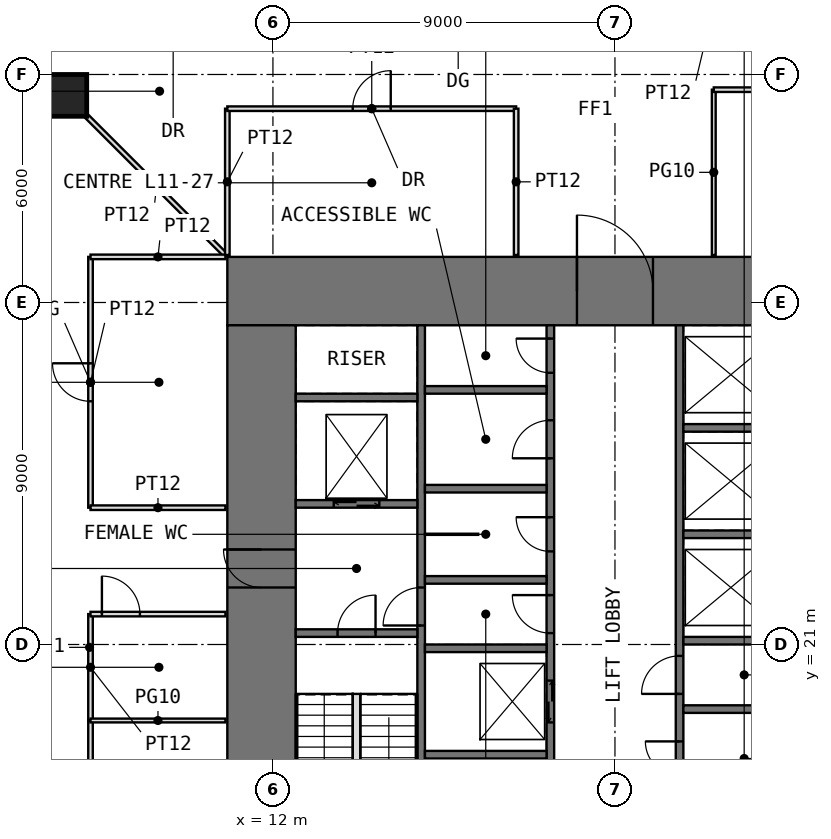
"""IFC4 building model, lengths in metres.
Left out: names, types, materials, properties, quantities, classifications, styles, units other than length and angle.
Written with IfcOpenShell. Run it as: python <this file> out.ifc"""

import sys

from ifc_helpers import new_model, si_unit, direction, frame, frame_2d, origin, origin_2d, place, context, subcontext, project, spatial, rectangle, extrude, element, fill, save


model = new_model("IFC4")
c1 = context("Model", 3, precision=1e-05, world=origin(), true_north=direction((0.0, 1.0)))
c2 = subcontext(c1, "Body", "Model", "MODEL_VIEW")
j1 = project(units=[si_unit("LENGTHUNIT", "METRE"), si_unit("PLANEANGLEUNIT", "RADIAN")], contexts=[c1])
p1 = place(None, origin())
s1 = spatial("IfcSite", under=j1, at=p1, CompositionType="ELEMENT")
p2 = place(p1, origin())
s2 = spatial("IfcBuilding", under=s1, at=p2, CompositionType="ELEMENT")
p3 = place(p2, frame((0.0, 0.0, 50.5)))
s3 = spatial("IfcBuildingStorey", under=s2, at=p3, CompositionType="ELEMENT", Elevation=50.5)
p4 = place(p3, frame((6.55, 35.45, 0.0), z_axis=(0.0, 0.0, 1.0), x_axis=(1.0, 0.0, 0.0)))
e1 = element("IfcColumn", 1, at=p4, inside=s3, PredefinedType="COLUMN", context=c2, shape_type="SweptSolid", body=[
    extrude(rectangle(XDim=1.1, YDim=1.1, at=origin_2d()), origin(), (0.0, 0.0, 1.0), 4.0),
])
p5 = place(p3, frame((10.8, 30.3, -0.05), z_axis=(0.0, 0.0, 1.0), x_axis=(1.0, 0.0, 0.0)))
e2 = element("IfcWall", 2, at=p5, inside=s3, PredefinedType="SHEAR", context=c2, shape_type="SweptSolid", body=[
    extrude(rectangle(XDim=20.4, YDim=1.8, at=frame_2d((10.2, 0.0))), origin(), (0.0, 0.0, 1.0), 4.0),
])
p6 = place(p5, frame((9.2, 0.0, 0.05)))
e3 = element("IfcOpeningElement", 3, at=p6, cuts=e2, PredefinedType="OPENING", context=c2, shape_type="SweptSolid", body=[
    extrude(rectangle(XDim=2.0, YDim=2.2, at=frame_2d((1.0, 1.1))), frame((0.0, 0.91, 0.0), z_axis=(0.0, -1.0, 0.0), x_axis=(1.0, 0.0, 0.0)), (0.0, 0.0, 1.0), 1.82),
])
p7 = place(p3, frame((11.7, 12.6, -0.05), z_axis=(0.0, 0.0, 1.0), x_axis=(0.0, 1.0, 0.0)))
e4 = element("IfcWall", 4, at=p7, inside=s3, PredefinedType="SHEAR", context=c2, shape_type="SweptSolid", body=[
    extrude(rectangle(XDim=16.8, YDim=1.8, at=frame_2d((8.4, 0.0))), origin(), (0.0, 0.0, 1.0), 4.0),
])
p8 = place(p7, frame((9.9, 0.0, 0.05)))
e5 = element("IfcOpeningElement", 5, at=p8, cuts=e4, PredefinedType="OPENING", context=c2, shape_type="SweptSolid", body=[
    extrude(rectangle(XDim=1.0, YDim=2.2, at=frame_2d((0.5, 1.1))), frame((0.0, 0.91, 0.0), z_axis=(0.0, -1.0, 0.0), x_axis=(1.0, 0.0, 0.0)), (0.0, 0.0, 1.0), 1.82),
])
p9 = place(p3, frame((15.9, 12.6, -0.05), z_axis=(0.0, 0.0, 1.0), x_axis=(0.0, 1.0, 0.0)))
e6 = element("IfcWall", 6, at=p9, inside=s3, PredefinedType="SHEAR", context=c2, shape_type="SweptSolid", body=[
    extrude(rectangle(XDim=16.8, YDim=0.2, at=frame_2d((8.4, 0.0))), origin(), (0.0, 0.0, 1.0), 4.0),
])
p10 = place(p9, frame((8.9, 0.0, 0.05)))
e7 = element("IfcOpeningElement", 7, at=p10, cuts=e6, PredefinedType="OPENING", context=c2, shape_type="SweptSolid", body=[
    extrude(rectangle(XDim=1.0, YDim=2.2, at=frame_2d((0.5, 1.1))), frame((0.0, 0.11, 0.0), z_axis=(0.0, -1.0, 0.0), x_axis=(1.0, 0.0, 0.0)), (0.0, 0.0, 1.0), 0.22),
])
p11 = place(p3, frame((19.3, 12.6, -0.05), z_axis=(0.0, 0.0, 1.0), x_axis=(0.0, 1.0, 0.0)))
e8 = element("IfcWall", 8, at=p11, inside=s3, PredefinedType="SHEAR", context=c2, shape_type="SweptSolid", body=[
    extrude(rectangle(XDim=16.8, YDim=0.2, at=frame_2d((8.4, 0.0))), origin(), (0.0, 0.0, 1.0), 4.0),
])
p12 = place(p11, frame((8.7, 0.0, 0.05)))
e9 = element("IfcOpeningElement", 9, at=p12, cuts=e8, PredefinedType="OPENING", context=c2, shape_type="SweptSolid", body=[
    extrude(rectangle(XDim=1.0, YDim=2.2, at=frame_2d((0.5, 1.1))), frame((0.0, 0.11, 0.0), z_axis=(0.0, -1.0, 0.0), x_axis=(1.0, 0.0, 0.0)), (0.0, 0.0, 1.0), 0.22),
])
p13 = place(p11, frame((10.85, 0.0, 0.05)))
e10 = element("IfcOpeningElement", 10, at=p13, cuts=e8, PredefinedType="OPENING", context=c2, shape_type="SweptSolid", body=[
    extrude(rectangle(XDim=0.9, YDim=2.2, at=frame_2d((0.45, 1.1))), frame((0.0, 0.11, 0.0), z_axis=(0.0, -1.0, 0.0), x_axis=(1.0, 0.0, 0.0)), (0.0, 0.0, 1.0), 0.22),
])
p14 = place(p11, frame((13.3, 0.0, 0.05)))
e11 = element("IfcOpeningElement", 11, at=p14, cuts=e8, PredefinedType="OPENING", context=c2, shape_type="SweptSolid", body=[
    extrude(rectangle(XDim=1.0, YDim=2.2, at=frame_2d((0.5, 1.1))), frame((0.0, 0.11, 0.0), z_axis=(0.0, -1.0, 0.0), x_axis=(1.0, 0.0, 0.0)), (0.0, 0.0, 1.0), 0.22),
])
p15 = place(p11, frame((15.55, 0.0, 0.05)))
e12 = element("IfcOpeningElement", 12, at=p15, cuts=e8, PredefinedType="OPENING", context=c2, shape_type="SweptSolid", body=[
    extrude(rectangle(XDim=0.9, YDim=2.2, at=frame_2d((0.45, 1.1))), frame((0.0, 0.11, 0.0), z_axis=(0.0, -1.0, 0.0), x_axis=(1.0, 0.0, 0.0)), (0.0, 0.0, 1.0), 0.22),
])
p16 = place(p11, frame((0.75, 0.0, 0.05)))
e13 = element("IfcOpeningElement", 13, at=p16, cuts=e8, PredefinedType="OPENING", context=c2, shape_type="SweptSolid", body=[
    extrude(rectangle(XDim=1.1, YDim=2.2, at=frame_2d((0.55, 1.1))), frame((0.0, 0.11, 0.0), z_axis=(0.0, -1.0, 0.0), x_axis=(1.0, 0.0, 0.0)), (0.0, 0.0, 1.0), 0.22),
])
p17 = place(p11, frame((3.55, 0.0, 0.05)))
e14 = element("IfcOpeningElement", 14, at=p17, cuts=e8, PredefinedType="OPENING", context=c2, shape_type="SweptSolid", body=[
    extrude(rectangle(XDim=1.1, YDim=2.2, at=frame_2d((0.55, 1.1))), frame((0.0, 0.11, 0.0), z_axis=(0.0, -1.0, 0.0), x_axis=(1.0, 0.0, 0.0)), (0.0, 0.0, 1.0), 0.22),
])
p18 = place(p11, frame((6.35, 0.0, 0.05)))
e15 = element("IfcOpeningElement", 15, at=p18, cuts=e8, PredefinedType="OPENING", context=c2, shape_type="SweptSolid", body=[
    extrude(rectangle(XDim=1.1, YDim=2.2, at=frame_2d((0.55, 1.1))), frame((0.0, 0.11, 0.0), z_axis=(0.0, -1.0, 0.0), x_axis=(1.0, 0.0, 0.0)), (0.0, 0.0, 1.0), 0.22),
])
p19 = place(p3, frame((22.7, 12.6, -0.05), z_axis=(0.0, 0.0, 1.0), x_axis=(0.0, 1.0, 0.0)))
e16 = element("IfcWall", 16, at=p19, inside=s3, PredefinedType="SHEAR", context=c2, shape_type="SweptSolid", body=[
    extrude(rectangle(XDim=16.8, YDim=0.2, at=frame_2d((8.4, 0.0))), origin(), (0.0, 0.0, 1.0), 4.0),
])
p20 = place(p19, frame((0.45, 0.0, 0.05)))
e17 = element("IfcOpeningElement", 17, at=p20, cuts=e16, PredefinedType="OPENING", context=c2, shape_type="SweptSolid", body=[
    extrude(rectangle(XDim=0.9, YDim=2.2, at=frame_2d((0.45, 1.1))), frame((0.0, 0.11, 0.0), z_axis=(0.0, -1.0, 0.0), x_axis=(1.0, 0.0, 0.0)), (0.0, 0.0, 1.0), 0.22),
])
p21 = place(p19, frame((7.1, 0.0, 0.05)))
e18 = element("IfcOpeningElement", 18, at=p21, cuts=e16, PredefinedType="OPENING", context=c2, shape_type="SweptSolid", body=[
    extrude(rectangle(XDim=1.0, YDim=2.2, at=frame_2d((0.5, 1.1))), frame((0.0, 0.11, 0.0), z_axis=(0.0, -1.0, 0.0), x_axis=(1.0, 0.0, 0.0)), (0.0, 0.0, 1.0), 0.22),
])
p22 = place(p19, frame((1.95, 0.0, 0.05)))
e19 = element("IfcOpeningElement", 19, at=p22, cuts=e16, PredefinedType="OPENING", context=c2, shape_type="SweptSolid", body=[
    extrude(rectangle(XDim=0.9, YDim=2.2, at=frame_2d((0.45, 1.1))), frame((0.0, 0.11, 0.0), z_axis=(0.0, -1.0, 0.0), x_axis=(1.0, 0.0, 0.0)), (0.0, 0.0, 1.0), 0.22),
])
p23 = place(p19, frame((4.95, 0.0, 0.05)))
e20 = element("IfcOpeningElement", 20, at=p23, cuts=e16, PredefinedType="OPENING", context=c2, shape_type="SweptSolid", body=[
    extrude(rectangle(XDim=0.9, YDim=2.2, at=frame_2d((0.45, 1.1))), frame((0.0, 0.11, 0.0), z_axis=(0.0, -1.0, 0.0), x_axis=(1.0, 0.0, 0.0)), (0.0, 0.0, 1.0), 0.22),
])
p24 = place(p3, frame((12.6, 21.3, -0.05), z_axis=(0.0, 0.0, 1.0), x_axis=(1.0, 0.0, 0.0)))
e21 = element("IfcWall", 21, at=p24, inside=s3, PredefinedType="SHEAR", context=c2, shape_type="SweptSolid", body=[
    extrude(rectangle(XDim=3.2, YDim=0.2, at=frame_2d((1.6, 0.0))), origin(), (0.0, 0.0, 1.0), 4.0),
])
p25 = place(p24, frame((1.1, 0.0, 0.05)))
e22 = element("IfcOpeningElement", 22, at=p25, cuts=e21, PredefinedType="OPENING", context=c2, shape_type="SweptSolid", body=[
    extrude(rectangle(XDim=1.0, YDim=2.2, at=frame_2d((0.5, 1.1))), frame((0.0, 0.11, 0.0), z_axis=(0.0, -1.0, 0.0), x_axis=(1.0, 0.0, 0.0)), (0.0, 0.0, 1.0), 0.22),
])
p26 = place(p3, frame((12.6, 24.7, -0.05), z_axis=(0.0, 0.0, 1.0), x_axis=(1.0, 0.0, 0.0)))
e23 = element("IfcWall", 23, at=p26, inside=s3, PredefinedType="SHEAR", context=c2, shape_type="SweptSolid", body=[
    extrude(rectangle(XDim=3.2, YDim=0.2, at=frame_2d((1.6, 0.0))), origin(), (0.0, 0.0, 1.0), 4.0),
])
p27 = place(p26, frame((1.0, 0.0, 0.05)))
e24 = element("IfcOpeningElement", 24, at=p27, cuts=e23, PredefinedType="OPENING", context=c2, shape_type="SweptSolid", body=[
    extrude(rectangle(XDim=1.2, YDim=2.2, at=frame_2d((0.6, 1.1))), frame((0.0, 0.11, 0.0), z_axis=(0.0, -1.0, 0.0), x_axis=(1.0, 0.0, 0.0)), (0.0, 0.0, 1.0), 0.22),
])
for number, where, z_axis, x_axis in (
    (25, (12.6, 27.5, -0.05), (0.0, 0.0, 1.0), (1.0, 0.0, 0.0)),
    (26, (16.0, 18.1, -0.05), (0.0, 0.0, 1.0), (1.0, 0.0, 0.0)),
    (27, (16.0, 20.9, -0.05), (0.0, 0.0, 1.0), (1.0, 0.0, 0.0)),
    (28, (16.0, 22.7, -0.05), (0.0, 0.0, 1.0), (1.0, 0.0, 0.0)),
    (29, (16.0, 25.1, -0.05), (0.0, 0.0, 1.0), (1.0, 0.0, 0.0)),
    (30, (16.0, 27.7, -0.05), (0.0, 0.0, 1.0), (1.0, 0.0, 0.0)),
    (31, (22.8, 19.3, -0.05), (0.0, 0.0, 1.0), (1.0, 0.0, 0.0)),
    (32, (22.8, 21.1, -0.05), (0.0, 0.0, 1.0), (1.0, 0.0, 0.0)),
    (33, (22.8, 23.9, -0.05), (0.0, 0.0, 1.0), (1.0, 0.0, 0.0)),
    (34, (22.8, 26.7, -0.05), (0.0, 0.0, 1.0), (1.0, 0.0, 0.0)),
):
    element("IfcWall", number, at=place(p3, frame(where, z_axis=z_axis, x_axis=x_axis)), inside=s3, PredefinedType="SHEAR", context=c2, shape_type="SweptSolid", body=[
        extrude(rectangle(XDim=3.2, YDim=0.2, at=frame_2d((1.6, 0.0))), origin(), (0.0, 0.0, 1.0), 4.0),
    ])
p28 = place(p3, frame((16.0, 23.9, 0.0), z_axis=(0.0, 0.0, 1.0), x_axis=(1.0, 0.0, 0.0)))
e35 = element("IfcWall", 35, at=p28, inside=s3, PredefinedType="PARTITIONING", context=c2, shape_type="SweptSolid", body=[
    extrude(rectangle(XDim=1.4, YDim=0.03, at=frame_2d((0.7, 0.0))), origin(), (0.0, 0.0, 1.0), 3.75),
])
p29 = place(p3, frame((7.11, 34.89, 0.0), z_axis=(0.0, 0.0, 1.0), x_axis=(0.707106781187, -0.707106781187, 0.0)))
e36 = element("IfcWall", 36, at=p29, inside=s3, PredefinedType="PARTITIONING", context=c2, shape_type="SweptSolid", body=[
    extrude(rectangle(XDim=5.168, YDim=0.12, at=frame_2d((2.584, 0.0))), origin(), (0.0, 0.0, 1.0), 3.75),
])
p30 = place(p3, frame((7.2, 14.0, 0.0), z_axis=(0.0, 0.0, 1.0), x_axis=(0.0, 1.0, 0.0)))
e37 = element("IfcWall", 37, at=p30, inside=s3, PredefinedType="PARTITIONING", context=c2, shape_type="SweptSolid", body=[
    extrude(rectangle(XDim=5.0, YDim=0.12, at=frame_2d((2.5, 0.0))), origin(), (0.0, 0.0, 1.0), 3.75),
])
p31 = place(p30, frame((2.0, 0.0, 0.0)))
e38 = element("IfcOpeningElement", 38, at=p31, cuts=e37, PredefinedType="OPENING", context=c2, shape_type="SweptSolid", body=[
    extrude(rectangle(XDim=1.0, YDim=2.4, at=frame_2d((0.5, 1.2))), frame((0.0, 0.07, 0.0), z_axis=(0.0, -1.0, 0.0), x_axis=(1.0, 0.0, 0.0)), (0.0, 0.0, 1.0), 0.14),
])
p32 = place(p3, frame((7.2, 19.0, 0.0), z_axis=(0.0, 0.0, 1.0), x_axis=(0.0, 1.0, 0.0)))
e39 = element("IfcWall", 39, at=p32, inside=s3, PredefinedType="PARTITIONING", context=c2, shape_type="SweptSolid", body=[
    extrude(rectangle(XDim=2.8, YDim=0.12, at=frame_2d((1.4, 0.0))), origin(), (0.0, 0.0, 1.0), 3.75),
])
p33 = place(p3, frame((7.2, 19.0, 0.0), z_axis=(0.0, 0.0, 1.0), x_axis=(1.0, 0.0, 0.0)))
e40 = element("IfcWall", 40, at=p33, inside=s3, PredefinedType="PARTITIONING", context=c2, shape_type="SweptSolid", body=[
    extrude(rectangle(XDim=3.55, YDim=0.1, at=frame_2d((1.775, 0.0))), origin(), (0.0, 0.0, 1.0), 3.75),
])
p34 = place(p3, frame((7.2, 21.8, 0.0), z_axis=(0.0, 0.0, 1.0), x_axis=(1.0, 0.0, 0.0)))
e41 = element("IfcWall", 41, at=p34, inside=s3, PredefinedType="PARTITIONING", context=c2, shape_type="SweptSolid", body=[
    extrude(rectangle(XDim=3.55, YDim=0.12, at=frame_2d((1.775, 0.0))), origin(), (0.0, 0.0, 1.0), 3.75),
])
p35 = place(p34, frame((0.3, 0.0, 0.0)))
e42 = element("IfcOpeningElement", 42, at=p35, cuts=e41, PredefinedType="OPENING", context=c2, shape_type="SweptSolid", body=[
    extrude(rectangle(XDim=1.0, YDim=2.4, at=frame_2d((0.5, 1.2))), frame((0.0, 0.07, 0.0), z_axis=(0.0, -1.0, 0.0), x_axis=(1.0, 0.0, 0.0)), (0.0, 0.0, 1.0), 0.14),
])
p36 = place(p3, frame((7.2, 24.6, 0.0), z_axis=(0.0, 0.0, 1.0), x_axis=(0.0, 1.0, 0.0)))
e43 = element("IfcWall", 43, at=p36, inside=s3, PredefinedType="PARTITIONING", context=c2, shape_type="SweptSolid", body=[
    extrude(rectangle(XDim=6.6, YDim=0.12, at=frame_2d((3.3, 0.0))), origin(), (0.0, 0.0, 1.0), 3.75),
])
p37 = place(p36, frame((2.8, 0.0, 0.0)))
e44 = element("IfcOpeningElement", 44, at=p37, cuts=e43, PredefinedType="OPENING", context=c2, shape_type="SweptSolid", body=[
    extrude(rectangle(XDim=1.0, YDim=2.4, at=frame_2d((0.5, 1.2))), frame((0.0, 0.07, 0.0), z_axis=(0.0, -1.0, 0.0), x_axis=(1.0, 0.0, 0.0)), (0.0, 0.0, 1.0), 0.14),
])
for number, where, z_axis, x_axis in (
    (45, (7.2, 24.6, 0.0), (0.0, 0.0, 1.0), (1.0, 0.0, 0.0)),
    (46, (7.2, 31.2, 0.0), (0.0, 0.0, 1.0), (1.0, 0.0, 0.0)),
):
    element("IfcWall", number, at=place(p3, frame(where, z_axis=z_axis, x_axis=x_axis)), inside=s3, PredefinedType="PARTITIONING", context=c2, shape_type="SweptSolid", body=[
        extrude(rectangle(XDim=3.55, YDim=0.12, at=frame_2d((1.775, 0.0))), origin(), (0.0, 0.0, 1.0), 3.75),
    ])
p38 = place(p3, frame((10.8, 31.25, 0.0), z_axis=(0.0, 0.0, 1.0), x_axis=(0.0, 1.0, 0.0)))
e47 = element("IfcWall", 47, at=p38, inside=s3, PredefinedType="PARTITIONING", context=c2, shape_type="SweptSolid", body=[
    extrude(rectangle(XDim=3.85, YDim=0.12, at=frame_2d((1.925, 0.0))), origin(), (0.0, 0.0, 1.0), 3.75),
])
p39 = place(p3, frame((10.8, 35.1, 0.0), z_axis=(0.0, 0.0, 1.0), x_axis=(1.0, 0.0, 0.0)))
e48 = element("IfcWall", 48, at=p39, inside=s3, PredefinedType="PARTITIONING", context=c2, shape_type="SweptSolid", body=[
    extrude(rectangle(XDim=7.6, YDim=0.12, at=frame_2d((3.8, 0.0))), origin(), (0.0, 0.0, 1.0), 3.75),
])
p40 = place(p39, frame((3.3, 0.0, 0.0)))
e49 = element("IfcOpeningElement", 49, at=p40, cuts=e48, PredefinedType="OPENING", context=c2, shape_type="SweptSolid", body=[
    extrude(rectangle(XDim=1.0, YDim=2.2, at=frame_2d((0.5, 1.1))), frame((0.0, 0.07, 0.0), z_axis=(0.0, -1.0, 0.0), x_axis=(1.0, 0.0, 0.0)), (0.0, 0.0, 1.0), 0.14),
])
p41 = place(p3, frame((18.4, 31.25, 0.0), z_axis=(0.0, 0.0, 1.0), x_axis=(0.0, 1.0, 0.0)))
e50 = element("IfcWall", 50, at=p41, inside=s3, PredefinedType="PARTITIONING", context=c2, shape_type="SweptSolid", body=[
    extrude(rectangle(XDim=3.85, YDim=0.12, at=frame_2d((1.925, 0.0))), origin(), (0.0, 0.0, 1.0), 3.75),
])
p42 = place(p3, frame((23.6, 31.25, 0.0), z_axis=(0.0, 0.0, 1.0), x_axis=(0.0, 1.0, 0.0)))
e51 = element("IfcWall", 51, at=p42, inside=s3, PredefinedType="PARTITIONING", context=c2, shape_type="SweptSolid", body=[
    extrude(rectangle(XDim=4.35, YDim=0.1, at=frame_2d((2.175, 0.0))), origin(), (0.0, 0.0, 1.0), 3.75),
])
p43 = place(p3, frame((23.6, 35.6, 0.0), z_axis=(0.0, 0.0, 1.0), x_axis=(1.0, 0.0, 0.0)))
e52 = element("IfcWall", 52, at=p43, inside=s3, PredefinedType="PARTITIONING", context=c2, shape_type="SweptSolid", body=[
    extrude(rectangle(XDim=7.6, YDim=0.12, at=frame_2d((3.8, 0.0))), origin(), (0.0, 0.0, 1.0), 3.75),
])
p44 = place(p43, frame((3.3, 0.0, 0.0)))
e53 = element("IfcOpeningElement", 53, at=p44, cuts=e52, PredefinedType="OPENING", context=c2, shape_type="SweptSolid", body=[
    extrude(rectangle(XDim=1.0, YDim=2.4, at=frame_2d((0.5, 1.2))), frame((0.0, 0.07, 0.0), z_axis=(0.0, -1.0, 0.0), x_axis=(1.0, 0.0, 0.0)), (0.0, 0.0, 1.0), 0.14),
])
p45 = place(p3, frame((14.2, 16.62, 0.0), z_axis=(0.0, 0.0, 1.0), x_axis=(0.0, 1.0, 0.0)))
e54 = element("IfcWall", 54, at=p45, inside=s3, PredefinedType="PARTITIONING", context=c2, shape_type="SweptSolid", body=[
    extrude(rectangle(XDim=3.08, YDim=0.2, at=frame_2d((1.54, 0.0))), origin(), (0.0, 0.0, 1.0), 4.0),
])
p46 = place(p6, origin())
e55 = element("IfcDoor", 55, at=p46, inside=s3, OperationType="DOUBLE_DOOR_SINGLE_SWING", PredefinedType="DOOR", context=c2, shape_type="SweptSolid", body=[
    extrude(rectangle(XDim=2.0, YDim=2.2, at=frame_2d((1.0, 1.1))), frame((0.0, 0.025, 0.0), z_axis=(0.0, -1.0, 0.0), x_axis=(1.0, 0.0, 0.0)), (0.0, 0.0, 1.0), 0.05),
])
fill(e3, e55)
p47 = place(p8, origin())
e56 = element("IfcDoor", 56, at=p47, inside=s3, OperationType="SINGLE_SWING_RIGHT", PredefinedType="DOOR", context=c2, shape_type="SweptSolid", body=[
    extrude(rectangle(XDim=1.0, YDim=2.2, at=frame_2d((0.5, 1.1))), frame((0.0, 0.025, 0.0), z_axis=(0.0, -1.0, 0.0), x_axis=(1.0, 0.0, 0.0)), (0.0, 0.0, 1.0), 0.05),
])
fill(e5, e56)
p48 = place(p25, origin())
e57 = element("IfcDoor", 57, at=p48, inside=s3, OperationType="SINGLE_SWING_RIGHT", PredefinedType="DOOR", context=c2, shape_type="SweptSolid", body=[
    extrude(rectangle(XDim=1.0, YDim=2.2, at=frame_2d((0.5, 1.1))), frame((0.0, 0.025, 0.0), z_axis=(0.0, -1.0, 0.0), x_axis=(1.0, 0.0, 0.0)), (0.0, 0.0, 1.0), 0.05),
])
fill(e22, e57)
p49 = place(p10, origin())
e58 = element("IfcDoor", 58, at=p49, inside=s3, OperationType="SINGLE_SWING_LEFT", PredefinedType="DOOR", context=c2, shape_type="SweptSolid", body=[
    extrude(rectangle(XDim=1.0, YDim=2.2, at=frame_2d((0.5, 1.1))), frame((0.0, 0.025, 0.0), z_axis=(0.0, -1.0, 0.0), x_axis=(1.0, 0.0, 0.0)), (0.0, 0.0, 1.0), 0.05),
])
fill(e7, e58)
p50 = place(p12, origin())
e59 = element("IfcDoor", 59, at=p50, inside=s3, OperationType="SINGLE_SWING_RIGHT", PredefinedType="DOOR", context=c2, shape_type="SweptSolid", body=[
    extrude(rectangle(XDim=1.0, YDim=2.2, at=frame_2d((0.5, 1.1))), frame((0.0, 0.025, 0.0), z_axis=(0.0, -1.0, 0.0), x_axis=(1.0, 0.0, 0.0)), (0.0, 0.0, 1.0), 0.05),
])
fill(e9, e59)
p51 = place(p21, origin())
e60 = element("IfcDoor", 60, at=p51, inside=s3, OperationType="SINGLE_SWING_LEFT", PredefinedType="DOOR", context=c2, shape_type="SweptSolid", body=[
    extrude(rectangle(XDim=1.0, YDim=2.2, at=frame_2d((0.5, 1.1))), frame((0.0, 0.025, 0.0), z_axis=(0.0, -1.0, 0.0), x_axis=(1.0, 0.0, 0.0)), (0.0, 0.0, 1.0), 0.05),
])
fill(e18, e60)
p52 = place(p13, origin())
e61 = element("IfcDoor", 61, at=p52, inside=s3, OperationType="SINGLE_SWING_RIGHT", PredefinedType="DOOR", context=c2, shape_type="SweptSolid", body=[
    extrude(rectangle(XDim=0.9, YDim=2.2, at=frame_2d((0.45, 1.1))), frame((0.0, 0.025, 0.0), z_axis=(0.0, -1.0, 0.0), x_axis=(1.0, 0.0, 0.0)), (0.0, 0.0, 1.0), 0.05),
])
fill(e10, e61)
p53 = place(p14, origin())
e62 = element("IfcDoor", 62, at=p53, inside=s3, OperationType="SINGLE_SWING_LEFT", PredefinedType="DOOR", context=c2, shape_type="SweptSolid", body=[
    extrude(rectangle(XDim=1.0, YDim=2.2, at=frame_2d((0.5, 1.1))), frame((0.0, 0.025, 0.0), z_axis=(0.0, -1.0, 0.0), x_axis=(1.0, 0.0, 0.0)), (0.0, 0.0, 1.0), 0.05),
])
fill(e11, e62)
p54 = place(p15, origin())
e63 = element("IfcDoor", 63, at=p54, inside=s3, OperationType="SINGLE_SWING_RIGHT", PredefinedType="DOOR", context=c2, shape_type="SweptSolid", body=[
    extrude(rectangle(XDim=0.9, YDim=2.2, at=frame_2d((0.45, 1.1))), frame((0.0, 0.025, 0.0), z_axis=(0.0, -1.0, 0.0), x_axis=(1.0, 0.0, 0.0)), (0.0, 0.0, 1.0), 0.05),
])
fill(e12, e63)
p55 = place(p23, origin())
e64 = element("IfcDoor", 64, at=p55, inside=s3, OperationType="SINGLE_SWING_RIGHT", PredefinedType="DOOR", context=c2, shape_type="SweptSolid", body=[
    extrude(rectangle(XDim=0.9, YDim=2.2, at=frame_2d((0.45, 1.1))), frame((0.0, 0.025, 0.0), z_axis=(0.0, -1.0, 0.0), x_axis=(1.0, 0.0, 0.0)), (0.0, 0.0, 1.0), 0.05),
])
fill(e20, e64)
p56 = place(p40, origin())
e65 = element("IfcDoor", 65, at=p56, inside=s3, OperationType="SINGLE_SWING_RIGHT", PredefinedType="DOOR", context=c2, shape_type="SweptSolid", body=[
    extrude(rectangle(XDim=1.0, YDim=2.2, at=frame_2d((0.5, 1.1))), frame((0.0, 0.025, 0.0), z_axis=(0.0, -1.0, 0.0), x_axis=(1.0, 0.0, 0.0)), (0.0, 0.0, 1.0), 0.05),
])
fill(e49, e65)
p57 = place(p37, origin())
e66 = element("IfcDoor", 66, at=p57, inside=s3, OperationType="SINGLE_SWING_RIGHT", PredefinedType="DOOR", context=c2, shape_type="SweptSolid", body=[
    extrude(rectangle(XDim=1.0, YDim=2.4, at=frame_2d((0.5, 1.2))), frame((0.0, 0.025, 0.0), z_axis=(0.0, -1.0, 0.0), x_axis=(1.0, 0.0, 0.0)), (0.0, 0.0, 1.0), 0.05),
])
fill(e44, e66)
p58 = place(p35, origin())
e67 = element("IfcDoor", 67, at=p58, inside=s3, OperationType="SINGLE_SWING_LEFT", PredefinedType="DOOR", context=c2, shape_type="SweptSolid", body=[
    extrude(rectangle(XDim=1.0, YDim=2.4, at=frame_2d((0.5, 1.2))), frame((0.0, 0.025, 0.0), z_axis=(0.0, -1.0, 0.0), x_axis=(1.0, 0.0, 0.0)), (0.0, 0.0, 1.0), 0.05),
])
fill(e42, e67)
p59 = place(p18, origin())
e68 = element("IfcDoor", 68, at=p59, inside=s3, OperationType="DOUBLE_DOOR_SLIDING", PredefinedType="DOOR", context=c2, shape_type="SweptSolid", body=[
    extrude(rectangle(XDim=1.1, YDim=2.2, at=frame_2d((0.55, 1.1))), frame((0.0, 0.025, 0.0), z_axis=(0.0, -1.0, 0.0), x_axis=(1.0, 0.0, 0.0)), (0.0, 0.0, 1.0), 0.05),
])
fill(e15, e68)
p60 = place(p27, origin())
e69 = element("IfcDoor", 69, at=p60, inside=s3, OperationType="DOUBLE_DOOR_SLIDING", PredefinedType="DOOR", context=c2, shape_type="SweptSolid", body=[
    extrude(rectangle(XDim=1.2, YDim=2.2, at=frame_2d((0.6, 1.1))), frame((0.0, 0.025, 0.0), z_axis=(0.0, -1.0, 0.0), x_axis=(1.0, 0.0, 0.0)), (0.0, 0.0, 1.0), 0.05),
])
fill(e24, e69)
save(model, sys.argv[1])
